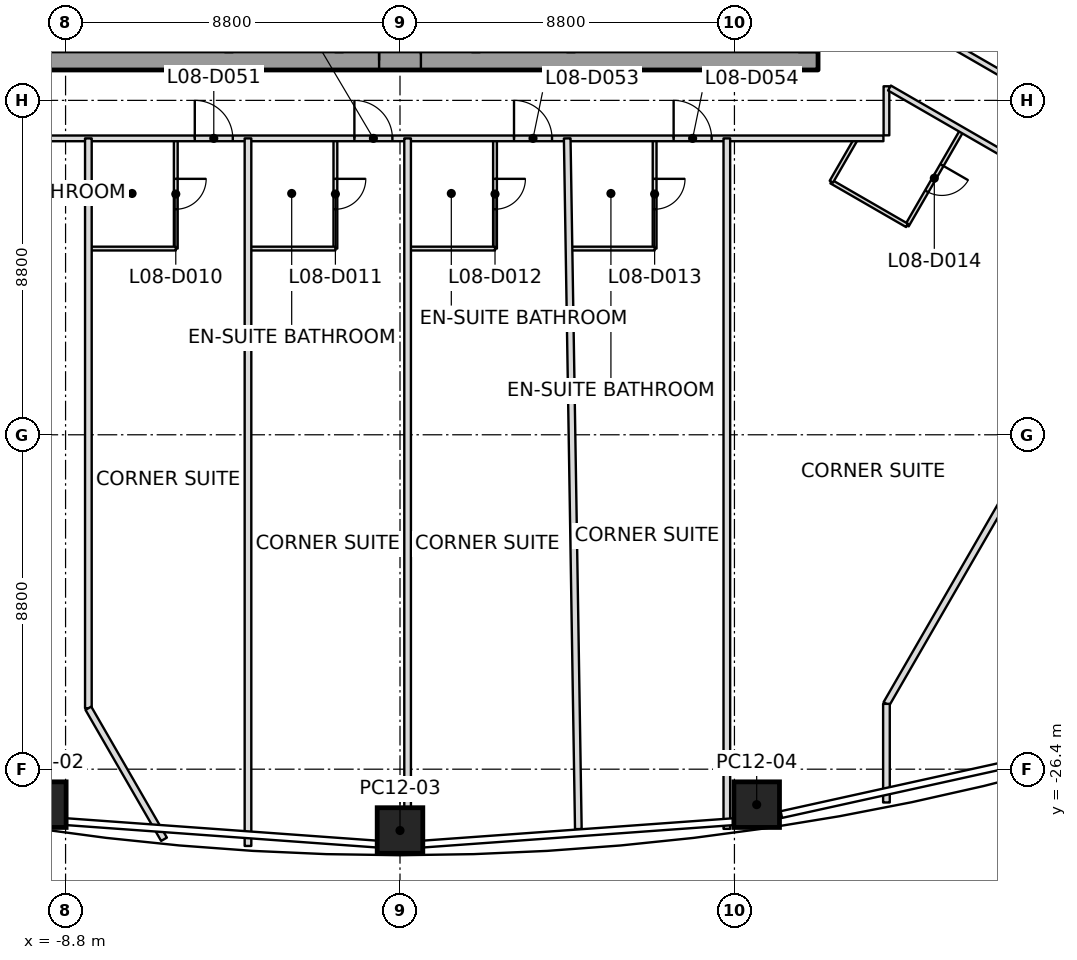
"""IFC4 building model, lengths in metres.
Left out: names, types, materials, properties, quantities, classifications, styles, units other than length and angle.
Written with IfcOpenShell. Run it as: python <this file> out.ifc"""

import sys

from ifc_helpers import new_model, si_unit, direction, frame, frame_2d, origin, origin_2d, place, context, subcontext, project, spatial, rectangle, extrude, element, fill, save


model = new_model("IFC4")
c1 = context("Model", 3, precision=1e-05, world=origin(), true_north=direction((0.0, 1.0)))
c2 = subcontext(c1, "Body", "Model", "MODEL_VIEW")
j1 = project(units=[si_unit("LENGTHUNIT", "METRE"), si_unit("PLANEANGLEUNIT", "RADIAN")], contexts=[c1])
p1 = place(None, origin())
s1 = spatial("IfcSite", under=j1, at=p1, CompositionType="ELEMENT")
p2 = place(p1, origin())
s2 = spatial("IfcBuilding", under=s1, at=p2, CompositionType="ELEMENT")
p3 = place(p2, frame((0.0, 0.0, 51.7)))
s3 = spatial("IfcBuildingStorey", under=s2, at=p3, CompositionType="ELEMENT", Elevation=51.7)
p4 = place(p3, frame((-9.385, -27.333, 0.0), z_axis=(0.009452762663, 0.224036905553, 0.974534817351), x_axis=(0.982720582571, -0.182243855241, 0.032364082218)))
e1 = element("IfcColumn", 1, at=p4, inside=s3, PredefinedType="COLUMN", context=c2, shape_type="SweptSolid", body=[
    extrude(rectangle(XDim=1.2, YDim=1.2, at=origin_2d()), origin(), (0.0, 0.0, 1.0), 3.797),
])
p5 = place(p3, frame((0.0, -28.014, 0.0), z_axis=(0.0, 0.23868906442, 0.971096045984), x_axis=(-1.0, 0.0, 0.0)))
e2 = element("IfcColumn", 2, at=p5, inside=s3, PredefinedType="COLUMN", context=c2, shape_type="SweptSolid", body=[
    extrude(rectangle(XDim=1.2, YDim=1.2, at=origin_2d()), origin(), (0.0, 0.0, 1.0), 3.81),
])
p6 = place(p3, frame((9.385, -27.333, 0.0), z_axis=(-0.009452762663, 0.224036905553, 0.974534817351), x_axis=(-0.982720582571, -0.182243855241, 0.032364082218)))
e3 = element("IfcColumn", 3, at=p6, inside=s3, PredefinedType="COLUMN", context=c2, shape_type="SweptSolid", body=[
    extrude(rectangle(XDim=1.2, YDim=1.2, at=origin_2d()), origin(), (0.0, 0.0, 1.0), 3.797),
])
p7 = place(p3, frame((-11.0, -7.75, 0.0), z_axis=(0.0, 0.0, 1.0), x_axis=(1.0, 0.0, 0.0)))
e4 = element("IfcWall", 4, at=p7, inside=s3, PredefinedType="SHEAR", context=c2, shape_type="SweptSolid", body=[
    extrude(rectangle(XDim=22.0, YDim=0.5, at=frame_2d((11.0, 0.0))), origin(), (0.0, 0.0, 1.0), 3.7),
])
p8 = place(p7, frame((10.45, 0.0, 0.0)))
e5 = element("IfcOpeningElement", 5, at=p8, cuts=e4, PredefinedType="OPENING", context=c2, shape_type="SweptSolid", body=[
    extrude(rectangle(XDim=1.1, YDim=2.1, at=frame_2d((0.55, 1.05))), frame((0.0, 0.25, 0.0), z_axis=(0.0, -1.0, 0.0), x_axis=(1.0, 0.0, 0.0)), (0.0, 0.0, 1.0), 0.5),
])
p9 = place(p3, frame((-8.2, -9.8, 0.0), z_axis=(0.0, 0.0, 1.0), x_axis=(0.0, -1.0, 0.0)))
e6 = element("IfcWall", 6, at=p9, inside=s3, PredefinedType="PARTITIONING", context=c2, shape_type="SweptSolid", body=[
    extrude(rectangle(XDim=14.997, YDim=0.175, at=frame_2d((7.498, 0.0))), origin(), (0.0, 0.0, 1.0), 3.15),
])
p10 = place(p3, frame((-8.2, -24.797, 0.0), z_axis=(0.0, 0.0, 1.0), x_axis=(0.499984338927, -0.86603444552, 0.0)))
e7 = element("IfcWall", 7, at=p10, inside=s3, PredefinedType="PARTITIONING", context=c2, shape_type="SweptSolid", body=[
    extrude(rectangle(XDim=3.981, YDim=0.175, at=frame_2d((1.991, 0.0))), origin(), (0.0, 0.0, 1.0), 2.934),
])
p11 = place(p3, frame((-4.0, -9.8, 0.0), z_axis=(0.0, 0.0, 1.0), x_axis=(0.0, -1.0, 0.0)))
e8 = element("IfcWall", 8, at=p11, inside=s3, PredefinedType="PARTITIONING", context=c2, shape_type="SweptSolid", body=[
    extrude(rectangle(XDim=18.62, YDim=0.175, at=frame_2d((9.31, 0.0))), origin(), (0.0, 0.0, 1.0), 2.934),
])
p12 = place(p3, frame((0.2, -9.8, 0.0), z_axis=(0.0, 0.0, 1.0), x_axis=(0.0, -1.0, 0.0)))
e9 = element("IfcWall", 9, at=p12, inside=s3, PredefinedType="PARTITIONING", context=c2, shape_type="SweptSolid", body=[
    extrude(rectangle(XDim=18.741, YDim=0.175, at=frame_2d((9.371, 0.0))), origin(), (0.0, 0.0, 1.0), 3.15),
])
p13 = place(p3, frame((4.4, -9.8, 0.0), z_axis=(0.0, 0.0, 1.0), x_axis=(0.016103328935, -0.999870332992, 0.0)))
e10 = element("IfcWall", 10, at=p13, inside=s3, PredefinedType="PARTITIONING", context=c2, shape_type="SweptSolid", body=[
    extrude(rectangle(XDim=18.178, YDim=0.175, at=frame_2d((9.089, 0.0))), origin(), (0.0, 0.0, 1.0), 2.934),
])
p14 = place(p3, frame((8.6, -9.8, 0.0), z_axis=(0.0, 0.0, 1.0), x_axis=(0.0, -1.0, 0.0)))
e11 = element("IfcWall", 11, at=p14, inside=s3, PredefinedType="PARTITIONING", context=c2, shape_type="SweptSolid", body=[
    extrude(rectangle(XDim=18.17, YDim=0.175, at=frame_2d((9.085, 0.0))), origin(), (0.0, 0.0, 1.0), 2.934),
])
p15 = place(p3, frame((19.837, -12.492, 0.0), z_axis=(0.0, 0.0, 1.0), x_axis=(-0.499999252047, -0.866025835615, 0.0)))
e12 = element("IfcWall", 12, at=p15, inside=s3, PredefinedType="PARTITIONING", context=c2, shape_type="SweptSolid", body=[
    extrude(rectangle(XDim=14.074, YDim=0.175, at=frame_2d((7.037, 0.0))), origin(), (0.0, 0.0, 1.0), 2.797),
])
p16 = place(p3, frame((12.8, -24.68, 0.0), z_axis=(0.0, 0.0, 1.0), x_axis=(0.0, -1.0, 0.0)))
e13 = element("IfcWall", 13, at=p16, inside=s3, PredefinedType="PARTITIONING", context=c2, shape_type="SweptSolid", body=[
    extrude(rectangle(XDim=2.595, YDim=0.175, at=frame_2d((1.298, 0.0))), origin(), (0.0, 0.0, 1.0), 2.934),
])
p17 = place(p3, frame((-12.72, -9.8, 0.0), z_axis=(0.0, 0.0, 1.0), x_axis=(1.0, 0.0, 0.0)))
e14 = element("IfcWall", 14, at=p17, inside=s3, PredefinedType="PARTITIONING", context=c2, shape_type="SweptSolid", body=[
    extrude(rectangle(XDim=25.44, YDim=0.15, at=frame_2d((12.72, 0.0))), origin(), (0.0, 0.0, 1.0), 2.947),
])
p18 = place(p17, frame((7.32, 0.0, 0.0)))
e15 = element("IfcOpeningElement", 15, at=p18, cuts=e14, PredefinedType="OPENING", context=c2, shape_type="SweptSolid", body=[
    extrude(rectangle(XDim=1.0, YDim=2.1, at=frame_2d((0.5, 1.05))), frame((0.0, 0.075, 0.0), z_axis=(0.0, -1.0, 0.0), x_axis=(1.0, 0.0, 0.0)), (0.0, 0.0, 1.0), 0.15),
])
p19 = place(p17, frame((11.52, 0.0, 0.0)))
e16 = element("IfcOpeningElement", 16, at=p19, cuts=e14, PredefinedType="OPENING", context=c2, shape_type="SweptSolid", body=[
    extrude(rectangle(XDim=1.0, YDim=2.1, at=frame_2d((0.5, 1.05))), frame((0.0, 0.075, 0.0), z_axis=(0.0, -1.0, 0.0), x_axis=(1.0, 0.0, 0.0)), (0.0, 0.0, 1.0), 0.15),
])
p20 = place(p17, frame((15.72, 0.0, 0.0)))
e17 = element("IfcOpeningElement", 17, at=p20, cuts=e14, PredefinedType="OPENING", context=c2, shape_type="SweptSolid", body=[
    extrude(rectangle(XDim=1.0, YDim=2.1, at=frame_2d((0.5, 1.05))), frame((0.0, 0.075, 0.0), z_axis=(0.0, -1.0, 0.0), x_axis=(1.0, 0.0, 0.0)), (0.0, 0.0, 1.0), 0.15),
])
p21 = place(p17, frame((19.92, 0.0, 0.0)))
e18 = element("IfcOpeningElement", 18, at=p21, cuts=e14, PredefinedType="OPENING", context=c2, shape_type="SweptSolid", body=[
    extrude(rectangle(XDim=1.0, YDim=2.1, at=frame_2d((0.5, 1.05))), frame((0.0, 0.075, 0.0), z_axis=(0.0, -1.0, 0.0), x_axis=(1.0, 0.0, 0.0)), (0.0, 0.0, 1.0), 0.15),
])
p22 = place(p3, frame((12.8, -9.72, 0.0), z_axis=(0.0, 0.0, 1.0), x_axis=(0.0, 1.0, 0.0)))
e19 = element("IfcWall", 19, at=p22, inside=s3, PredefinedType="PARTITIONING", context=c2, shape_type="SweptSolid", body=[
    extrude(rectangle(XDim=1.291, YDim=0.15, at=frame_2d((0.646, 0.0))), origin(), (0.0, 0.0, 1.0), 2.797),
])
p23 = place(p3, frame((12.879, -8.475, 0.0), z_axis=(0.0, 0.0, 1.0), x_axis=(0.866022744679, -0.500004605677, 0.0)))
e20 = element("IfcWall", 20, at=p23, inside=s3, PredefinedType="PARTITIONING", context=c2, shape_type="SweptSolid", body=[
    extrude(rectangle(XDim=12.234, YDim=0.15, at=frame_2d((6.117, 0.0))), origin(), (0.0, 0.0, 1.0), 2.797),
])
p24 = place(p23, frame((4.671, 0.0, 0.0)))
e21 = element("IfcOpeningElement", 21, at=p24, cuts=e20, PredefinedType="OPENING", context=c2, shape_type="SweptSolid", body=[
    extrude(rectangle(XDim=1.0, YDim=2.1, at=frame_2d((0.5, 1.05))), frame((0.0, 0.075, 0.0), z_axis=(0.0, -1.0, 0.0), x_axis=(1.0, 0.0, 0.0)), (0.0, 0.0, 1.0), 0.15),
])
p25 = place(p23, frame((10.834, 0.0, 0.0)))
e22 = element("IfcOpeningElement", 22, at=p25, cuts=e20, PredefinedType="OPENING", context=c2, shape_type="SweptSolid", body=[
    extrude(rectangle(XDim=1.0, YDim=2.1, at=frame_2d((0.5, 1.05))), frame((0.0, 0.075, 0.0), z_axis=(0.0, -1.0, 0.0), x_axis=(1.0, 0.0, 0.0)), (0.0, 0.0, 1.0), 0.15),
])
p26 = place(p3, frame((24.305, -12.993, 0.0), z_axis=(0.0, 0.0, 1.0), x_axis=(-0.86602583418, 0.499999254532, 0.0)))
e23 = element("IfcWall", 23, at=p26, inside=s3, PredefinedType="PARTITIONING", context=c2, shape_type="SweptSolid", body=[
    extrude(rectangle(XDim=13.285, YDim=0.15, at=frame_2d((6.642, 0.0))), origin(), (0.0, 0.0, 1.0), 2.947),
])
p27 = place(p26, frame((3.102, 0.0, 0.0)))
e24 = element("IfcOpeningElement", 24, at=p27, cuts=e23, PredefinedType="OPENING", context=c2, shape_type="SweptSolid", body=[
    extrude(rectangle(XDim=1.0, YDim=2.1, at=frame_2d((0.5, 1.05))), frame((0.0, 0.075, 0.0), z_axis=(0.0, -1.0, 0.0), x_axis=(1.0, 0.0, 0.0)), (0.0, 0.0, 1.0), 0.15),
])
p28 = place(p26, frame((7.685, 0.0, 0.0)))
e25 = element("IfcOpeningElement", 25, at=p28, cuts=e23, PredefinedType="OPENING", context=c2, shape_type="SweptSolid", body=[
    extrude(rectangle(XDim=1.0, YDim=2.1, at=frame_2d((0.5, 1.05))), frame((0.0, 0.075, 0.0), z_axis=(0.0, -1.0, 0.0), x_axis=(1.0, 0.0, 0.0)), (0.0, 0.0, 1.0), 0.15),
])
p29 = place(p3, frame((-5.9, -9.83, 0.0), z_axis=(0.0, 0.0, 1.0), x_axis=(0.0, -1.0, 0.0)))
e26 = element("IfcWall", 26, at=p29, inside=s3, PredefinedType="PARTITIONING", context=c2, shape_type="SweptSolid", body=[
    extrude(rectangle(XDim=2.87, YDim=0.1, at=frame_2d((1.435, 0.0))), origin(), (0.0, 0.0, 1.0), 3.15),
])
p30 = place(p29, frame((1.035, 0.0, 0.0)))
e27 = element("IfcOpeningElement", 27, at=p30, cuts=e26, PredefinedType="OPENING", context=c2, shape_type="SweptSolid", body=[
    extrude(rectangle(XDim=0.8, YDim=2.1, at=frame_2d((0.4, 1.05))), frame((0.0, 0.05, 0.0), z_axis=(0.0, -1.0, 0.0), x_axis=(1.0, 0.0, 0.0)), (0.0, 0.0, 1.0), 0.1),
])
p31 = place(p3, frame((-5.9, -12.7, 0.0), z_axis=(0.0, 0.0, 1.0), x_axis=(-1.0, 0.0, 0.0)))
e28 = element("IfcWall", 28, at=p31, inside=s3, PredefinedType="PARTITIONING", context=c2, shape_type="SweptSolid", body=[
    extrude(rectangle(XDim=2.27, YDim=0.1, at=frame_2d((1.135, 0.0))), origin(), (0.0, 0.0, 1.0), 2.947),
])
p32 = place(p3, frame((-1.7, -9.83, 0.0), z_axis=(0.0, 0.0, 1.0), x_axis=(0.0, -1.0, 0.0)))
e29 = element("IfcWall", 29, at=p32, inside=s3, PredefinedType="PARTITIONING", context=c2, shape_type="SweptSolid", body=[
    extrude(rectangle(XDim=2.87, YDim=0.1, at=frame_2d((1.435, 0.0))), origin(), (0.0, 0.0, 1.0), 3.15),
])
p33 = place(p32, frame((1.035, 0.0, 0.0)))
e30 = element("IfcOpeningElement", 30, at=p33, cuts=e29, PredefinedType="OPENING", context=c2, shape_type="SweptSolid", body=[
    extrude(rectangle(XDim=0.8, YDim=2.1, at=frame_2d((0.4, 1.05))), frame((0.0, 0.05, 0.0), z_axis=(0.0, -1.0, 0.0), x_axis=(1.0, 0.0, 0.0)), (0.0, 0.0, 1.0), 0.1),
])
p34 = place(p3, frame((-1.7, -12.7, 0.0), z_axis=(0.0, 0.0, 1.0), x_axis=(-1.0, 0.0, 0.0)))
e31 = element("IfcWall", 31, at=p34, inside=s3, PredefinedType="PARTITIONING", context=c2, shape_type="SweptSolid", body=[
    extrude(rectangle(XDim=2.27, YDim=0.1, at=frame_2d((1.135, 0.0))), origin(), (0.0, 0.0, 1.0), 2.947),
])
p35 = place(p3, frame((2.5, -9.83, 0.0), z_axis=(0.0, 0.0, 1.0), x_axis=(0.0, -1.0, 0.0)))
e32 = element("IfcWall", 32, at=p35, inside=s3, PredefinedType="PARTITIONING", context=c2, shape_type="SweptSolid", body=[
    extrude(rectangle(XDim=2.87, YDim=0.1, at=frame_2d((1.435, 0.0))), origin(), (0.0, 0.0, 1.0), 3.15),
])
p36 = place(p35, frame((1.035, 0.0, 0.0)))
e33 = element("IfcOpeningElement", 33, at=p36, cuts=e32, PredefinedType="OPENING", context=c2, shape_type="SweptSolid", body=[
    extrude(rectangle(XDim=0.8, YDim=2.1, at=frame_2d((0.4, 1.05))), frame((0.0, 0.05, 0.0), z_axis=(0.0, -1.0, 0.0), x_axis=(1.0, 0.0, 0.0)), (0.0, 0.0, 1.0), 0.1),
])
p37 = place(p3, frame((2.5, -12.7, 0.0), z_axis=(0.0, 0.0, 1.0), x_axis=(-1.0, 0.0, 0.0)))
e34 = element("IfcWall", 34, at=p37, inside=s3, PredefinedType="PARTITIONING", context=c2, shape_type="SweptSolid", body=[
    extrude(rectangle(XDim=2.27, YDim=0.1, at=frame_2d((1.135, 0.0))), origin(), (0.0, 0.0, 1.0), 3.15),
])
p38 = place(p3, frame((6.7, -9.83, 0.0), z_axis=(0.0, 0.0, 1.0), x_axis=(0.0, -1.0, 0.0)))
e35 = element("IfcWall", 35, at=p38, inside=s3, PredefinedType="PARTITIONING", context=c2, shape_type="SweptSolid", body=[
    extrude(rectangle(XDim=2.87, YDim=0.1, at=frame_2d((1.435, 0.0))), origin(), (0.0, 0.0, 1.0), 3.15),
])
p39 = place(p38, frame((1.035, 0.0, 0.0)))
e36 = element("IfcOpeningElement", 36, at=p39, cuts=e35, PredefinedType="OPENING", context=c2, shape_type="SweptSolid", body=[
    extrude(rectangle(XDim=0.8, YDim=2.1, at=frame_2d((0.4, 1.05))), frame((0.0, 0.05, 0.0), z_axis=(0.0, -1.0, 0.0), x_axis=(1.0, 0.0, 0.0)), (0.0, 0.0, 1.0), 0.1),
])
p40 = place(p3, frame((6.7, -12.7, 0.0), z_axis=(0.0, 0.0, 1.0), x_axis=(-1.0, 0.0, 0.0)))
e37 = element("IfcWall", 37, at=p40, inside=s3, PredefinedType="PARTITIONING", context=c2, shape_type="SweptSolid", body=[
    extrude(rectangle(XDim=2.27, YDim=0.1, at=frame_2d((1.135, 0.0))), origin(), (0.0, 0.0, 1.0), 2.947),
])
p41 = place(p3, frame((14.777, -9.605, 0.0), z_axis=(0.0, 0.0, 1.0), x_axis=(-0.499999802827, -0.866025517622, 0.0)))
e38 = element("IfcWall", 38, at=p41, inside=s3, PredefinedType="PARTITIONING", context=c2, shape_type="SweptSolid", body=[
    extrude(rectangle(XDim=2.87, YDim=0.1, at=frame_2d((1.435, 0.0))), origin(), (0.0, 0.0, 1.0), 2.797),
])
p42 = place(p41, frame((1.035, 0.0, 0.0)))
e39 = element("IfcOpeningElement", 39, at=p42, cuts=e38, PredefinedType="OPENING", context=c2, shape_type="SweptSolid", body=[
    extrude(rectangle(XDim=0.8, YDim=2.1, at=frame_2d((0.4, 1.05))), frame((0.0, 0.05, 0.0), z_axis=(0.0, -1.0, 0.0), x_axis=(1.0, 0.0, 0.0)), (0.0, 0.0, 1.0), 0.1),
])
p43 = place(p3, frame((13.342, -12.091, 0.0), z_axis=(0.0, 0.0, 1.0), x_axis=(-0.86602648383, 0.499998129301, 0.0)))
e40 = element("IfcWall", 40, at=p43, inside=s3, PredefinedType="PARTITIONING", context=c2, shape_type="SweptSolid", body=[
    extrude(rectangle(XDim=2.3, YDim=0.1, at=frame_2d((1.15, 0.0))), origin(), (0.0, 0.0, 1.0), 2.947),
])
p44 = place(p3, frame((11.35, -10.941, 0.0), z_axis=(0.0, 0.0, 1.0), x_axis=(0.499865263774, 0.866103179807, 0.0)))
e41 = element("IfcWall", 41, at=p44, inside=s3, PredefinedType="PARTITIONING", context=c2, shape_type="SweptSolid", body=[
    extrude(rectangle(XDim=1.282, YDim=0.1, at=frame_2d((0.641, 0.0))), origin(), (0.0, 0.0, 1.0), 3.15),
])
p45 = place(p18, origin())
e42 = element("IfcDoor", 42, at=p45, inside=s3, OperationType="SINGLE_SWING_LEFT", PredefinedType="DOOR", context=c2, shape_type="SweptSolid", body=[
    extrude(rectangle(XDim=1.0, YDim=2.1, at=frame_2d((0.5, 1.05))), frame((0.0, 0.025, 0.0), z_axis=(0.0, -1.0, 0.0), x_axis=(1.0, 0.0, 0.0)), (0.0, 0.0, 1.0), 0.05),
])
fill(e15, e42)
p46 = place(p30, origin())
e43 = element("IfcDoor", 43, at=p46, inside=s3, OperationType="SINGLE_SWING_LEFT", PredefinedType="DOOR", context=c2, shape_type="SweptSolid", body=[
    extrude(rectangle(XDim=0.8, YDim=2.1, at=frame_2d((0.4, 1.05))), frame((0.0, 0.025, 0.0), z_axis=(0.0, -1.0, 0.0), x_axis=(1.0, 0.0, 0.0)), (0.0, 0.0, 1.0), 0.05),
])
fill(e27, e43)
p47 = place(p19, origin())
e44 = element("IfcDoor", 44, at=p47, inside=s3, OperationType="SINGLE_SWING_LEFT", PredefinedType="DOOR", context=c2, shape_type="SweptSolid", body=[
    extrude(rectangle(XDim=1.0, YDim=2.1, at=frame_2d((0.5, 1.05))), frame((0.0, 0.025, 0.0), z_axis=(0.0, -1.0, 0.0), x_axis=(1.0, 0.0, 0.0)), (0.0, 0.0, 1.0), 0.05),
])
fill(e16, e44)
p48 = place(p33, origin())
e45 = element("IfcDoor", 45, at=p48, inside=s3, OperationType="SINGLE_SWING_LEFT", PredefinedType="DOOR", context=c2, shape_type="SweptSolid", body=[
    extrude(rectangle(XDim=0.8, YDim=2.1, at=frame_2d((0.4, 1.05))), frame((0.0, 0.025, 0.0), z_axis=(0.0, -1.0, 0.0), x_axis=(1.0, 0.0, 0.0)), (0.0, 0.0, 1.0), 0.05),
])
fill(e30, e45)
p49 = place(p20, origin())
e46 = element("IfcDoor", 46, at=p49, inside=s3, OperationType="SINGLE_SWING_LEFT", PredefinedType="DOOR", context=c2, shape_type="SweptSolid", body=[
    extrude(rectangle(XDim=1.0, YDim=2.1, at=frame_2d((0.5, 1.05))), frame((0.0, 0.025, 0.0), z_axis=(0.0, -1.0, 0.0), x_axis=(1.0, 0.0, 0.0)), (0.0, 0.0, 1.0), 0.05),
])
fill(e17, e46)
p50 = place(p36, origin())
e47 = element("IfcDoor", 47, at=p50, inside=s3, OperationType="SINGLE_SWING_RIGHT", PredefinedType="DOOR", context=c2, shape_type="SweptSolid", body=[
    extrude(rectangle(XDim=0.8, YDim=2.1, at=frame_2d((0.4, 1.05))), frame((0.0, 0.025, 0.0), z_axis=(0.0, -1.0, 0.0), x_axis=(1.0, 0.0, 0.0)), (0.0, 0.0, 1.0), 0.05),
])
fill(e33, e47)
p51 = place(p21, origin())
e48 = element("IfcDoor", 48, at=p51, inside=s3, OperationType="SINGLE_SWING_LEFT", PredefinedType="DOOR", context=c2, shape_type="SweptSolid", body=[
    extrude(rectangle(XDim=1.0, YDim=2.1, at=frame_2d((0.5, 1.05))), frame((0.0, 0.025, 0.0), z_axis=(0.0, -1.0, 0.0), x_axis=(1.0, 0.0, 0.0)), (0.0, 0.0, 1.0), 0.05),
])
fill(e18, e48)
p52 = place(p39, origin())
e49 = element("IfcDoor", 49, at=p52, inside=s3, OperationType="SINGLE_SWING_LEFT", PredefinedType="DOOR", context=c2, shape_type="SweptSolid", body=[
    extrude(rectangle(XDim=0.8, YDim=2.1, at=frame_2d((0.4, 1.05))), frame((0.0, 0.025, 0.0), z_axis=(0.0, -1.0, 0.0), x_axis=(1.0, 0.0, 0.0)), (0.0, 0.0, 1.0), 0.05),
])
fill(e36, e49)
p53 = place(p42, origin())
e50 = element("IfcDoor", 50, at=p53, inside=s3, OperationType="SINGLE_SWING_RIGHT", PredefinedType="DOOR", context=c2, shape_type="SweptSolid", body=[
    extrude(rectangle(XDim=0.8, YDim=2.1, at=frame_2d((0.4, 1.05))), frame((0.0, 0.025, 0.0), z_axis=(0.0, -1.0, 0.0), x_axis=(1.0, 0.0, 0.0)), (0.0, 0.0, 1.0), 0.05),
])
fill(e39, e50)
p54 = place(p8, origin())
e51 = element("IfcDoor", 51, at=p54, inside=s3, OperationType="SINGLE_SWING_LEFT", PredefinedType="DOOR", context=c2, shape_type="SweptSolid", body=[
    extrude(rectangle(XDim=1.1, YDim=2.1, at=frame_2d((0.55, 1.05))), frame((0.0, 0.025, 0.0), z_axis=(0.0, -1.0, 0.0), x_axis=(1.0, 0.0, 0.0)), (0.0, 0.0, 1.0), 0.05),
])
fill(e5, e51)
save(model, sys.argv[1])
